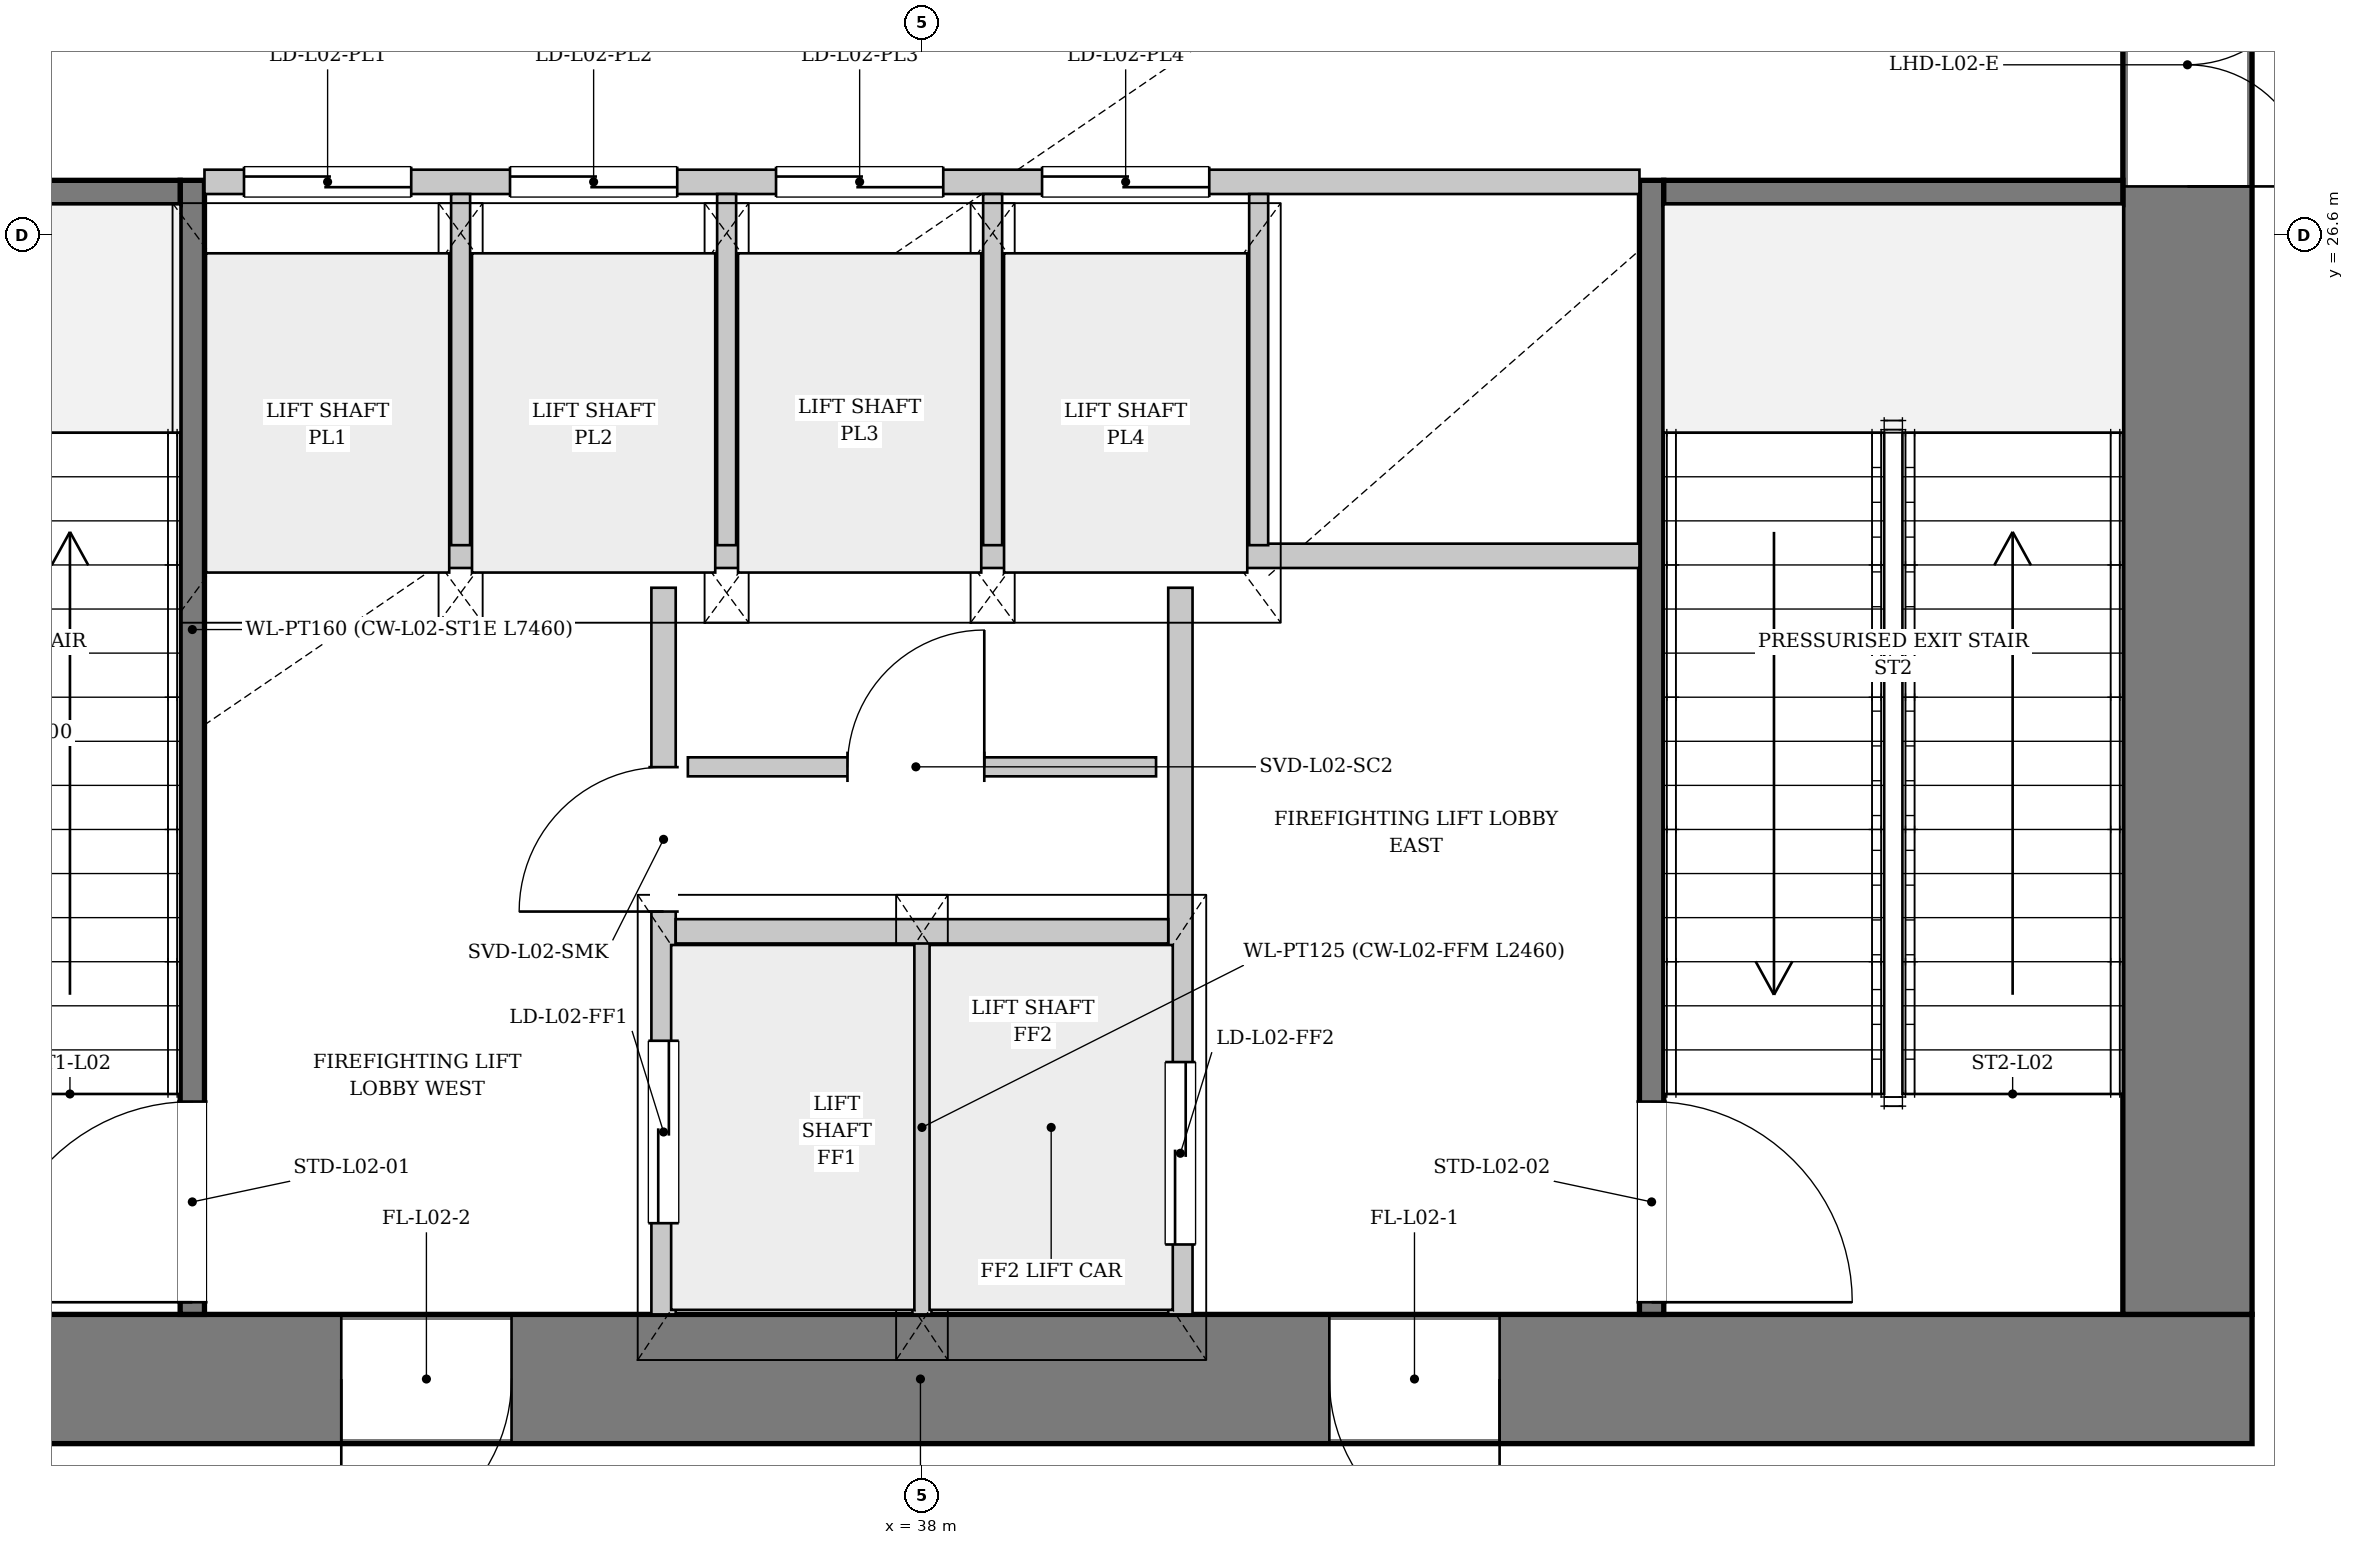
"""IFC4 building model, lengths in metres.
Left out: names, types, materials, properties, quantities, classifications, styles, units other than length and angle.
Written with IfcOpenShell. Run it as: python <this file> out.ifc"""

import sys

from ifc_helpers import new_model, si_unit, direction, frame, frame_2d, origin, place, context, subcontext, project, spatial, rectangle, extrude, source, transform, mapped, element, fill, save


model = new_model("IFC4")
c1 = context("Model", 3, precision=1e-05, world=origin(), true_north=direction((0.0, 1.0)))
c2 = subcontext(c1, "Body", "Model", "MODEL_VIEW")
j1 = project(units=[si_unit("LENGTHUNIT", "METRE"), si_unit("PLANEANGLEUNIT", "RADIAN")], contexts=[c1])
p1 = place(None, origin())
s1 = spatial("IfcSite", under=j1, at=p1, CompositionType="ELEMENT")
p2 = place(p1, origin())
s2 = spatial("IfcBuilding", under=s1, at=p2, CompositionType="ELEMENT")
p3 = place(p2, frame((0.0, 0.0, 10.2)))
s3 = spatial("IfcBuildingStorey", under=s2, at=p3, CompositionType="ELEMENT", Elevation=10.2)
p4 = place(p3, frame((46.75, 19.075, 0.0), z_axis=(0.0, 0.0, 1.0), x_axis=(-1.0, 0.0, 0.0)))
e1 = element("IfcWall", 1, at=p4, inside=s3, PredefinedType="SHEAR", context=c2, shape_type="SweptSolid", body=[
    extrude(rectangle(XDim=17.5, YDim=0.85, at=frame_2d((8.75, 0.0))), origin(), (0.0, 0.0, 1.0), 5.08),
])
p5 = place(p4, frame((4.95, 0.0, 0.0)))
e2 = element("IfcOpeningElement", 2, at=p5, cuts=e1, PredefinedType="OPENING", context=c2, shape_type="SweptSolid", body=[
    extrude(rectangle(XDim=1.12, YDim=2.25, at=frame_2d((0.56, 1.125))), frame((0.0, 0.435, 0.0), z_axis=(0.0, -1.0, 0.0), x_axis=(1.0, 0.0, 0.0)), (0.0, 0.0, 1.0), 0.87),
])
p6 = place(p4, frame((11.45, 0.0, 0.0)))
e3 = element("IfcOpeningElement", 3, at=p6, cuts=e1, PredefinedType="OPENING", context=c2, shape_type="SweptSolid", body=[
    extrude(rectangle(XDim=1.12, YDim=2.25, at=frame_2d((0.56, 1.125))), frame((0.0, 0.435, 0.0), z_axis=(0.0, -1.0, 0.0), x_axis=(1.0, 0.0, 0.0)), (0.0, 0.0, 1.0), 0.87),
])
p7 = place(p3, frame((46.325, 33.7, 0.0), z_axis=(0.0, 0.0, 1.0), x_axis=(0.0, -1.0, 0.0)))
e4 = element("IfcWall", 4, at=p7, inside=s3, PredefinedType="SHEAR", context=c2, shape_type="SweptSolid", body=[
    extrude(rectangle(XDim=14.2, YDim=0.85, at=frame_2d((7.1, 0.0))), origin(), (0.0, 0.0, 1.0), 5.08),
])
p8 = place(p7, frame((5.18, 0.0, 0.0)))
e5 = element("IfcOpeningElement", 5, at=p8, cuts=e4, PredefinedType="OPENING", context=c2, shape_type="SweptSolid", body=[
    extrude(rectangle(XDim=1.6, YDim=2.2, at=frame_2d((0.8, 1.1))), frame((0.0, 0.435, 0.0), z_axis=(0.0, -1.0, 0.0), x_axis=(1.0, 0.0, 0.0)), (0.0, 0.0, 1.0), 0.87),
])
p9 = place(p3, frame((33.2, 19.5, 0.0), z_axis=(0.0, 0.0, 1.0), x_axis=(0.0, 1.0, 0.0)))
e6 = element("IfcWall", 6, at=p9, inside=s3, PredefinedType="PARTITIONING", context=c2, shape_type="SweptSolid", body=[
    extrude(rectangle(XDim=7.46, YDim=0.16, at=frame_2d((3.73, 0.0))), origin(), (0.0, 0.0, 1.0), 5.08),
])
p10 = place(p9, frame((0.08, 0.0, 0.0)))
e7 = element("IfcOpeningElement", 7, at=p10, cuts=e6, PredefinedType="OPENING", context=c2, shape_type="SweptSolid", body=[
    extrude(rectangle(XDim=1.32, YDim=2.2, at=frame_2d((0.66, 1.1))), frame((0.0, 0.09, 0.0), z_axis=(0.0, -1.0, 0.0), x_axis=(1.0, 0.0, 0.0)), (0.0, 0.0, 1.0), 0.18),
])
p11 = place(p3, frame((30.1, 26.88, 0.0), z_axis=(0.0, 0.0, 1.0), x_axis=(1.0, 0.0, 0.0)))
e8 = element("IfcWall", 8, at=p11, inside=s3, PredefinedType="PARTITIONING", context=c2, shape_type="SweptSolid", body=[
    extrude(rectangle(XDim=3.02, YDim=0.16, at=frame_2d((1.51, 0.0))), origin(), (0.0, 0.0, 1.0), 5.08),
])
p12 = place(p3, frame((42.8, 26.96, 0.0), z_axis=(0.0, 0.0, 1.0), x_axis=(0.0, -1.0, 0.0)))
e9 = element("IfcWall", 9, at=p12, inside=s3, PredefinedType="PARTITIONING", context=c2, shape_type="SweptSolid", body=[
    extrude(rectangle(XDim=7.46, YDim=0.16, at=frame_2d((3.73, 0.0))), origin(), (0.0, 0.0, 1.0), 5.08),
])
p13 = place(p12, frame((6.06, 0.0, 0.0)))
e10 = element("IfcOpeningElement", 10, at=p13, cuts=e9, PredefinedType="OPENING", context=c2, shape_type="SweptSolid", body=[
    extrude(rectangle(XDim=1.32, YDim=2.2, at=frame_2d((0.66, 1.1))), frame((0.0, 0.09, 0.0), z_axis=(0.0, -1.0, 0.0), x_axis=(1.0, 0.0, 0.0)), (0.0, 0.0, 1.0), 0.18),
])
p14 = place(p3, frame((42.88, 26.88, 0.0), z_axis=(0.0, 0.0, 1.0), x_axis=(1.0, 0.0, 0.0)))
e11 = element("IfcWall", 11, at=p14, inside=s3, PredefinedType="PARTITIONING", context=c2, shape_type="SweptSolid", body=[
    extrude(rectangle(XDim=3.02, YDim=0.16, at=frame_2d((1.51, 0.0))), origin(), (0.0, 0.0, 1.0), 5.08),
])
p15 = place(p3, frame((36.3, 19.5, 0.0), z_axis=(0.0, 0.0, 1.0), x_axis=(0.0, 1.0, 0.0)))
e12 = element("IfcWall", 12, at=p15, inside=s3, PredefinedType="PARTITIONING", context=c2, shape_type="SweptSolid", body=[
    extrude(rectangle(XDim=4.78, YDim=0.16, at=frame_2d((2.39, 0.0))), origin(), (0.0, 0.0, 1.0), 5.08),
])
p16 = place(p15, frame((0.6, 0.0, 0.0)))
e13 = element("IfcOpeningElement", 13, at=p16, cuts=e12, PredefinedType="OPENING", context=c2, shape_type="SweptSolid", body=[
    extrude(rectangle(XDim=1.2, YDim=2.2, at=frame_2d((0.6, 1.1))), frame((0.0, 0.09, 0.0), z_axis=(0.0, -1.0, 0.0), x_axis=(1.0, 0.0, 0.0)), (0.0, 0.0, 1.0), 0.18),
])
p17 = place(p15, frame((2.65, 0.0, 0.0)))
e14 = element("IfcOpeningElement", 14, at=p17, cuts=e12, PredefinedType="OPENING", context=c2, shape_type="SweptSolid", body=[
    extrude(rectangle(XDim=0.95, YDim=2.1, at=frame_2d((0.475, 1.05))), frame((0.0, 0.09, 0.0), z_axis=(0.0, -1.0, 0.0), x_axis=(1.0, 0.0, 0.0)), (0.0, 0.0, 1.0), 0.18),
])
p18 = place(p3, frame((39.7, 24.28, 0.0), z_axis=(0.0, 0.0, 1.0), x_axis=(0.0, -1.0, 0.0)))
e15 = element("IfcWall", 15, at=p18, inside=s3, PredefinedType="PARTITIONING", context=c2, shape_type="SweptSolid", body=[
    extrude(rectangle(XDim=4.78, YDim=0.16, at=frame_2d((2.39, 0.0))), origin(), (0.0, 0.0, 1.0), 5.08),
])
p19 = place(p18, frame((3.12, 0.0, 0.0)))
e16 = element("IfcOpeningElement", 16, at=p19, cuts=e15, PredefinedType="OPENING", context=c2, shape_type="SweptSolid", body=[
    extrude(rectangle(XDim=1.2, YDim=2.2, at=frame_2d((0.6, 1.1))), frame((0.0, 0.09, 0.0), z_axis=(0.0, -1.0, 0.0), x_axis=(1.0, 0.0, 0.0)), (0.0, 0.0, 1.0), 0.18),
])
p20 = place(p3, frame((38.0, 19.5, 0.0), z_axis=(0.0, 0.0, 1.0), x_axis=(0.0, 1.0, 0.0)))
e17 = element("IfcWall", 17, at=p20, inside=s3, PredefinedType="PARTITIONING", context=c2, shape_type="SweptSolid", body=[
    extrude(rectangle(XDim=2.46, YDim=0.125, at=frame_2d((1.23, 0.0))), origin(), (0.0, 0.0, 1.0), 5.08),
])
p21 = place(p3, frame((36.38, 22.02, 0.0), z_axis=(0.0, 0.0, 1.0), x_axis=(1.0, 0.0, 0.0)))
e18 = element("IfcWall", 18, at=p21, inside=s3, PredefinedType="PARTITIONING", context=c2, shape_type="SweptSolid", body=[
    extrude(rectangle(XDim=3.24, YDim=0.16, at=frame_2d((1.62, 0.0))), origin(), (0.0, 0.0, 1.0), 5.08),
])
p22 = place(p3, frame((33.28, 24.49, 0.0), z_axis=(0.0, 0.0, 1.0), x_axis=(1.0, 0.0, 0.0)))
e19 = element("IfcWall", 19, at=p22, inside=s3, PredefinedType="PARTITIONING", context=c2, shape_type="SweptSolid", body=[
    extrude(rectangle(XDim=9.44, YDim=0.16, at=frame_2d((4.72, 0.0))), origin(), (0.0, 0.0, 1.0), 5.08),
])
p23 = place(p3, frame((36.46, 23.102, 0.0), z_axis=(0.0, 0.0, 1.0), x_axis=(1.0, 0.0, 0.0)))
e20 = element("IfcWall", 20, at=p23, inside=s3, PredefinedType="PARTITIONING", context=c2, shape_type="SweptSolid", body=[
    extrude(rectangle(XDim=3.08, YDim=0.125, at=frame_2d((1.54, 0.0))), origin(), (0.0, 0.0, 1.0), 5.08),
])
p24 = place(p23, frame((1.05, 0.0, 0.0)))
e21 = element("IfcOpeningElement", 21, at=p24, cuts=e20, PredefinedType="OPENING", context=c2, shape_type="SweptSolid", body=[
    extrude(rectangle(XDim=0.9, YDim=2.1, at=frame_2d((0.45, 1.05))), frame((0.0, 0.073, 0.0), z_axis=(0.0, -1.0, 0.0), x_axis=(1.0, 0.0, 0.0)), (0.0, 0.0, 1.0), 0.145),
])
p25 = place(p3, frame((33.28, 26.95, 0.0), z_axis=(0.0, 0.0, 1.0), x_axis=(1.0, 0.0, 0.0)))
e22 = element("IfcWall", 22, at=p25, inside=s3, PredefinedType="PARTITIONING", context=c2, shape_type="SweptSolid", body=[
    extrude(rectangle(XDim=9.44, YDim=0.16, at=frame_2d((4.72, 0.0))), origin(), (0.0, 0.0, 1.0), 5.08),
])
p26 = place(p25, frame((0.26, 0.0, 0.0)))
e23 = element("IfcOpeningElement", 23, at=p26, cuts=e22, PredefinedType="OPENING", context=c2, shape_type="SweptSolid", body=[
    extrude(rectangle(XDim=1.1, YDim=2.2, at=frame_2d((0.55, 1.1))), frame((0.0, 0.09, 0.0), z_axis=(0.0, -1.0, 0.0), x_axis=(1.0, 0.0, 0.0)), (0.0, 0.0, 1.0), 0.18),
])
p27 = place(p25, frame((2.01, 0.0, 0.0)))
e24 = element("IfcOpeningElement", 24, at=p27, cuts=e22, PredefinedType="OPENING", context=c2, shape_type="SweptSolid", body=[
    extrude(rectangle(XDim=1.1, YDim=2.2, at=frame_2d((0.55, 1.1))), frame((0.0, 0.09, 0.0), z_axis=(0.0, -1.0, 0.0), x_axis=(1.0, 0.0, 0.0)), (0.0, 0.0, 1.0), 0.18),
])
p28 = place(p25, frame((3.76, 0.0, 0.0)))
e25 = element("IfcOpeningElement", 25, at=p28, cuts=e22, PredefinedType="OPENING", context=c2, shape_type="SweptSolid", body=[
    extrude(rectangle(XDim=1.1, YDim=2.2, at=frame_2d((0.55, 1.1))), frame((0.0, 0.09, 0.0), z_axis=(0.0, -1.0, 0.0), x_axis=(1.0, 0.0, 0.0)), (0.0, 0.0, 1.0), 0.18),
])
p29 = place(p25, frame((5.51, 0.0, 0.0)))
e26 = element("IfcOpeningElement", 26, at=p29, cuts=e22, PredefinedType="OPENING", context=c2, shape_type="SweptSolid", body=[
    extrude(rectangle(XDim=1.1, YDim=2.2, at=frame_2d((0.55, 1.1))), frame((0.0, 0.09, 0.0), z_axis=(0.0, -1.0, 0.0), x_axis=(1.0, 0.0, 0.0)), (0.0, 0.0, 1.0), 0.18),
])
for number, where, z_axis, x_axis in (
    (27, (34.965, 24.56, 0.0), (0.0, 0.0, 1.0), (0.0, 1.0, 0.0)),
    (28, (36.715, 24.56, 0.0), (0.0, 0.0, 1.0), (0.0, 1.0, 0.0)),
    (29, (38.465, 24.56, 0.0), (0.0, 0.0, 1.0), (0.0, 1.0, 0.0)),
    (30, (40.215, 24.56, 0.0), (0.0, 0.0, 1.0), (0.0, 1.0, 0.0)),
):
    element("IfcWall", number, at=place(p3, frame(where, z_axis=z_axis, x_axis=x_axis)), inside=s3, PredefinedType="PARTITIONING", context=c2, shape_type="SweptSolid", body=[
        extrude(rectangle(XDim=2.31, YDim=0.125, at=frame_2d((1.155, 0.0))), origin(), (0.0, 0.0, 1.0), 5.08),
    ])
m1 = source(origin(), c2, "Body", "SweptSolid", [
    extrude(rectangle(XDim=1.12, YDim=2.25, at=frame_2d((0.56, 1.125))), frame((0.0, 0.025, 0.0), z_axis=(0.0, -1.0, 0.0), x_axis=(1.0, 0.0, 0.0)), (0.0, 0.0, 1.0), 0.05),
])
p30 = place(p5, origin())
e31 = element("IfcDoor", 31, at=p30, inside=s3, OperationType="SINGLE_SWING_LEFT", PredefinedType="DOOR", context=c2, shape_type="MappedRepresentation", body=[
    mapped(m1, transform((0.0, 0.0, 0.0), x_axis=(1.0, 0.0, 0.0), y_axis=(0.0, 1.0, 0.0), z_axis=(0.0, 0.0, 1.0), scale=1.0)),
])
fill(e2, e31)
p31 = place(p6, origin())
e32 = element("IfcDoor", 32, at=p31, inside=s3, OperationType="SINGLE_SWING_RIGHT", PredefinedType="DOOR", context=c2, shape_type="MappedRepresentation", body=[
    mapped(m1, transform((0.0, 0.0, 0.0), x_axis=(1.0, 0.0, 0.0), y_axis=(0.0, 1.0, 0.0), z_axis=(0.0, 0.0, 1.0), scale=1.0)),
])
fill(e3, e32)
m2 = source(origin(), c2, "Body", "SweptSolid", [
    extrude(rectangle(XDim=1.6, YDim=2.2, at=frame_2d((0.8, 1.1))), frame((0.0, 0.025, 0.0), z_axis=(0.0, -1.0, 0.0), x_axis=(1.0, 0.0, 0.0)), (0.0, 0.0, 1.0), 0.05),
])
p32 = place(p8, origin())
e33 = element("IfcDoor", 33, at=p32, inside=s3, OperationType="DOUBLE_DOOR_SINGLE_SWING", PredefinedType="DOOR", context=c2, shape_type="MappedRepresentation", body=[
    mapped(m2, transform((0.0, 0.0, 0.0), x_axis=(1.0, 0.0, 0.0), y_axis=(0.0, 1.0, 0.0), z_axis=(0.0, 0.0, 1.0), scale=1.0)),
])
fill(e5, e33)
m3 = source(origin(), c2, "Body", "SweptSolid", [
    extrude(rectangle(XDim=1.32, YDim=2.2, at=frame_2d((0.66, 1.1))), frame((0.0, 0.025, 0.0), z_axis=(0.0, -1.0, 0.0), x_axis=(1.0, 0.0, 0.0)), (0.0, 0.0, 1.0), 0.05),
])
p33 = place(p10, origin())
e34 = element("IfcDoor", 34, at=p33, inside=s3, OperationType="SINGLE_SWING_LEFT", PredefinedType="DOOR", context=c2, shape_type="MappedRepresentation", body=[
    mapped(m3, transform((0.0, 0.0, 0.0), x_axis=(1.0, 0.0, 0.0), y_axis=(0.0, 1.0, 0.0), z_axis=(0.0, 0.0, 1.0), scale=1.0)),
])
fill(e7, e34)
p34 = place(p13, origin())
e35 = element("IfcDoor", 35, at=p34, inside=s3, OperationType="SINGLE_SWING_RIGHT", PredefinedType="DOOR", context=c2, shape_type="MappedRepresentation", body=[
    mapped(m3, transform((0.0, 0.0, 0.0), x_axis=(1.0, 0.0, 0.0), y_axis=(0.0, 1.0, 0.0), z_axis=(0.0, 0.0, 1.0), scale=1.0)),
])
fill(e10, e35)
m4 = source(origin(), c2, "Body", "SweptSolid", [
    extrude(rectangle(XDim=1.2, YDim=2.2, at=frame_2d((0.6, 1.1))), frame((0.0, 0.025, 0.0), z_axis=(0.0, -1.0, 0.0), x_axis=(1.0, 0.0, 0.0)), (0.0, 0.0, 1.0), 0.05),
])
p35 = place(p16, origin())
e36 = element("IfcDoor", 36, at=p35, inside=s3, OperationType="DOUBLE_DOOR_SLIDING", PredefinedType="DOOR", context=c2, shape_type="MappedRepresentation", body=[
    mapped(m4, transform((0.0, 0.0, 0.0), x_axis=(1.0, 0.0, 0.0), y_axis=(0.0, 1.0, 0.0), z_axis=(0.0, 0.0, 1.0), scale=1.0)),
])
fill(e13, e36)
m5 = source(origin(), c2, "Body", "SweptSolid", [
    extrude(rectangle(XDim=0.95, YDim=2.1, at=frame_2d((0.475, 1.05))), frame((0.0, 0.025, 0.0), z_axis=(0.0, -1.0, 0.0), x_axis=(1.0, 0.0, 0.0)), (0.0, 0.0, 1.0), 0.05),
])
p36 = place(p17, origin())
e37 = element("IfcDoor", 37, at=p36, inside=s3, OperationType="SINGLE_SWING_LEFT", PredefinedType="DOOR", context=c2, shape_type="MappedRepresentation", body=[
    mapped(m5, transform((0.0, 0.0, 0.0), x_axis=(1.0, 0.0, 0.0), y_axis=(0.0, 1.0, 0.0), z_axis=(0.0, 0.0, 1.0), scale=1.0)),
])
fill(e14, e37)
m6 = source(origin(), c2, "Body", "SweptSolid", [
    extrude(rectangle(XDim=0.9, YDim=2.1, at=frame_2d((0.45, 1.05))), frame((0.0, 0.025, 0.0), z_axis=(0.0, -1.0, 0.0), x_axis=(1.0, 0.0, 0.0)), (0.0, 0.0, 1.0), 0.05),
])
p37 = place(p24, origin())
e38 = element("IfcDoor", 38, at=p37, inside=s3, OperationType="SINGLE_SWING_RIGHT", PredefinedType="DOOR", context=c2, shape_type="MappedRepresentation", body=[
    mapped(m6, transform((0.0, 0.0, 0.0), x_axis=(1.0, 0.0, 0.0), y_axis=(0.0, 1.0, 0.0), z_axis=(0.0, 0.0, 1.0), scale=1.0)),
])
fill(e21, e38)
p38 = place(p19, origin())
e39 = element("IfcDoor", 39, at=p38, inside=s3, OperationType="DOUBLE_DOOR_SLIDING", PredefinedType="DOOR", context=c2, shape_type="MappedRepresentation", body=[
    mapped(m4, transform((0.0, 0.0, 0.0), x_axis=(1.0, 0.0, 0.0), y_axis=(0.0, 1.0, 0.0), z_axis=(0.0, 0.0, 1.0), scale=1.0)),
])
fill(e16, e39)
m7 = source(origin(), c2, "Body", "SweptSolid", [
    extrude(rectangle(XDim=1.1, YDim=2.2, at=frame_2d((0.55, 1.1))), frame((0.0, 0.025, 0.0), z_axis=(0.0, -1.0, 0.0), x_axis=(1.0, 0.0, 0.0)), (0.0, 0.0, 1.0), 0.05),
])
p39 = place(p26, origin())
e40 = element("IfcDoor", 40, at=p39, inside=s3, OperationType="DOUBLE_DOOR_SLIDING", PredefinedType="DOOR", context=c2, shape_type="MappedRepresentation", body=[
    mapped(m7, transform((0.0, 0.0, 0.0), x_axis=(1.0, 0.0, 0.0), y_axis=(0.0, 1.0, 0.0), z_axis=(0.0, 0.0, 1.0), scale=1.0)),
])
fill(e23, e40)
p40 = place(p27, origin())
e41 = element("IfcDoor", 41, at=p40, inside=s3, OperationType="DOUBLE_DOOR_SLIDING", PredefinedType="DOOR", context=c2, shape_type="MappedRepresentation", body=[
    mapped(m7, transform((0.0, 0.0, 0.0), x_axis=(1.0, 0.0, 0.0), y_axis=(0.0, 1.0, 0.0), z_axis=(0.0, 0.0, 1.0), scale=1.0)),
])
fill(e24, e41)
p41 = place(p28, origin())
e42 = element("IfcDoor", 42, at=p41, inside=s3, OperationType="DOUBLE_DOOR_SLIDING", PredefinedType="DOOR", context=c2, shape_type="MappedRepresentation", body=[
    mapped(m7, transform((0.0, 0.0, 0.0), x_axis=(1.0, 0.0, 0.0), y_axis=(0.0, 1.0, 0.0), z_axis=(0.0, 0.0, 1.0), scale=1.0)),
])
fill(e25, e42)
p42 = place(p29, origin())
e43 = element("IfcDoor", 43, at=p42, inside=s3, OperationType="DOUBLE_DOOR_SLIDING", PredefinedType="DOOR", context=c2, shape_type="MappedRepresentation", body=[
    mapped(m7, transform((0.0, 0.0, 0.0), x_axis=(1.0, 0.0, 0.0), y_axis=(0.0, 1.0, 0.0), z_axis=(0.0, 0.0, 1.0), scale=1.0)),
])
fill(e26, e43)
save(model, sys.argv[1])
